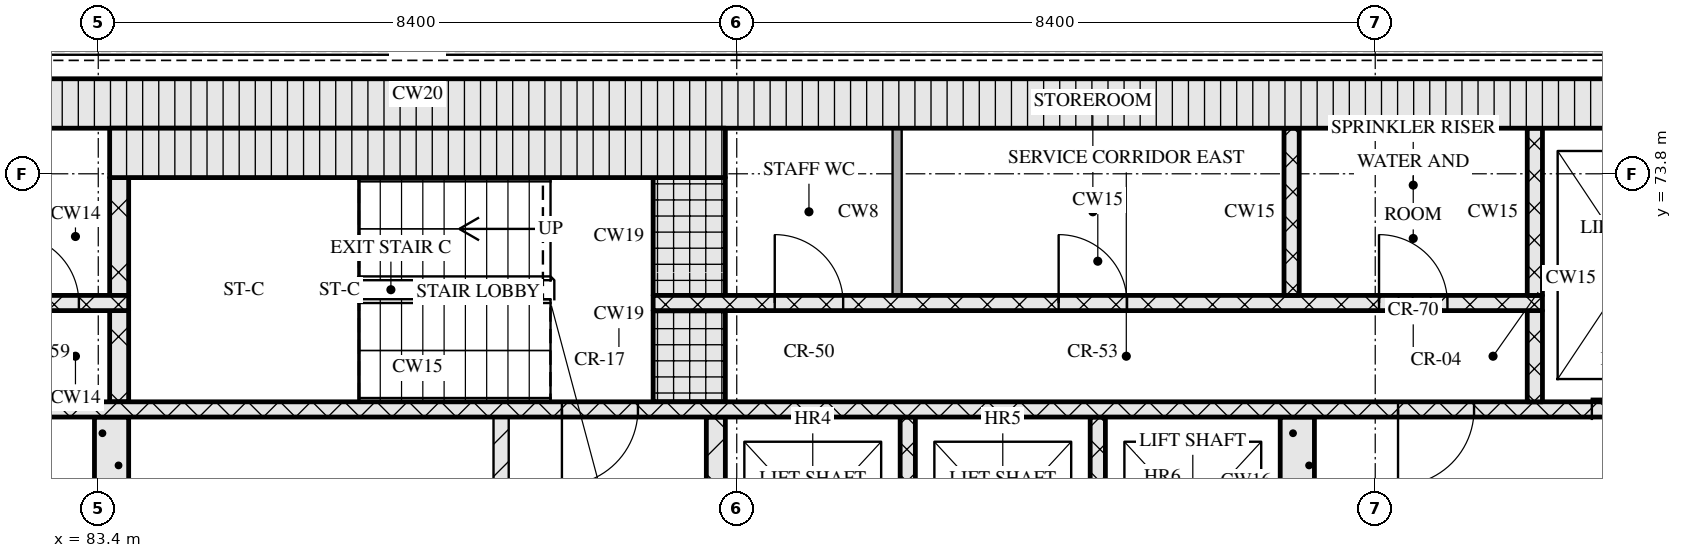
"""IFC4 building model, lengths in metres.
Left out: names, types, materials, properties, quantities, classifications, styles, units other than length and angle.
Written with IfcOpenShell. Run it as: python <this file> out.ifc"""

import sys

from ifc_helpers import new_model, si_unit, direction, frame, frame_2d, origin, place, context, subcontext, project, spatial, rectangle, extrude, element, fill, save


model = new_model("IFC4")
c1 = context("Model", 3, precision=1e-05, world=origin(), true_north=direction((0.0, 1.0)))
c2 = subcontext(c1, "Body", "Model", "MODEL_VIEW")
j1 = project(units=[si_unit("LENGTHUNIT", "METRE"), si_unit("PLANEANGLEUNIT", "RADIAN")], contexts=[c1])
p1 = place(None, origin())
s1 = spatial("IfcSite", under=j1, at=p1, CompositionType="ELEMENT")
p2 = place(p1, origin())
s2 = spatial("IfcBuilding", under=s1, at=p2, CompositionType="ELEMENT")
p3 = place(p2, frame((0.0, 0.0, 223.5)))
s3 = spatial("IfcBuildingStorey", under=s2, at=p3, CompositionType="ELEMENT", Elevation=223.5)
p4 = place(p3, frame((67.15, 74.725, 0.0), z_axis=(0.0, 0.0, 1.0), x_axis=(1.0, 0.0, 0.0)))
e1 = element("IfcWall", 1, at=p4, inside=s3, PredefinedType="SOLIDWALL", context=c2, shape_type="SweptSolid", body=[
    extrude(rectangle(XDim=40.9, YDim=0.65, at=frame_2d((20.45, 0.0))), origin(), (0.0, 0.0, 1.0), 3.32),
])
p5 = place(p3, frame((83.575, 68.0, 0.0), z_axis=(0.0, 0.0, 1.0), x_axis=(0.0, 1.0, 0.0)))
e2 = element("IfcWall", 2, at=p5, inside=s3, PredefinedType="SOLIDWALL", context=c2, shape_type="SweptSolid", body=[
    extrude(rectangle(XDim=2.6, YDim=0.45, at=frame_2d((1.3, 0.0))), origin(), (0.0, 0.0, 1.0), 3.32),
])
p6 = place(p3, frame((88.7, 68.0, 0.0), z_axis=(0.0, 0.0, 1.0), x_axis=(0.0, 1.0, 0.0)))
e3 = element("IfcWall", 3, at=p6, inside=s3, PredefinedType="PARTITIONING", context=c2, shape_type="SweptSolid", body=[
    extrude(rectangle(XDim=2.6, YDim=0.2, at=frame_2d((1.3, 0.0))), origin(), (0.0, 0.0, 1.0), 3.32),
])
p7 = place(p3, frame((91.525, 68.0, 0.0), z_axis=(0.0, 0.0, 1.0), x_axis=(0.0, 1.0, 0.0)))
e4 = element("IfcWall", 4, at=p7, inside=s3, PredefinedType="SOLIDWALL", context=c2, shape_type="SweptSolid", body=[
    extrude(rectangle(XDim=2.6, YDim=0.25, at=frame_2d((1.3, 0.0))), origin(), (0.0, 0.0, 1.0), 3.32),
])
for number, where, z_axis, x_axis in (
    (5, (94.05, 68.0, 0.0), (0.0, 0.0, 1.0), (0.0, 1.0, 0.0)),
    (6, (96.55, 68.0, 0.0), (0.0, 0.0, 1.0), (0.0, 1.0, 0.0)),
):
    element("IfcWall", number, at=place(p3, frame(where, z_axis=z_axis, x_axis=x_axis)), inside=s3, PredefinedType="SOLIDWALL", context=c2, shape_type="SweptSolid", body=[
        extrude(rectangle(XDim=2.6, YDim=0.2, at=frame_2d((1.3, 0.0))), origin(), (0.0, 0.0, 1.0), 3.32),
    ])
p8 = place(p3, frame((99.175, 68.3, 0.0), z_axis=(0.0, 0.0, 1.0), x_axis=(0.0, 1.0, 0.0)))
e7 = element("IfcWall", 7, at=p8, inside=s3, PredefinedType="SOLIDWALL", context=c2, shape_type="SweptSolid", body=[
    extrude(rectangle(XDim=2.3, YDim=0.45, at=frame_2d((1.15, 0.0))), origin(), (0.0, 0.0, 1.0), 3.32),
])
p9 = place(p3, frame((67.8, 70.7, 0.0), z_axis=(0.0, 0.0, 1.0), x_axis=(1.0, 0.0, 0.0)))
e8 = element("IfcWall", 8, at=p9, inside=s3, PredefinedType="SOLIDWALL", context=c2, shape_type="SweptSolid", body=[
    extrude(rectangle(XDim=39.6, YDim=0.2, at=frame_2d((19.8, 0.0))), origin(), (0.0, 0.0, 1.0), 3.32),
])
p10 = place(p9, frame((0.65, 0.0, 0.0)))
e9 = element("IfcOpeningElement", 9, at=p10, cuts=e8, PredefinedType="OPENING", context=c2, shape_type="SweptSolid", body=[
    extrude(rectangle(XDim=1.1, YDim=2.1, at=frame_2d((0.55, 1.05))), frame((0.0, 0.11, 0.0), z_axis=(0.0, -1.0, 0.0), x_axis=(1.0, 0.0, 0.0)), (0.0, 0.0, 1.0), 0.22),
])
p11 = place(p9, frame((3.25, 0.0, 0.0)))
e10 = element("IfcOpeningElement", 10, at=p11, cuts=e8, PredefinedType="OPENING", context=c2, shape_type="SweptSolid", body=[
    extrude(rectangle(XDim=1.1, YDim=2.1, at=frame_2d((0.55, 1.05))), frame((0.0, 0.11, 0.0), z_axis=(0.0, -1.0, 0.0), x_axis=(1.0, 0.0, 0.0)), (0.0, 0.0, 1.0), 0.22),
])
p12 = place(p9, frame((5.9, 0.0, 0.0)))
e11 = element("IfcOpeningElement", 11, at=p12, cuts=e8, PredefinedType="OPENING", context=c2, shape_type="SweptSolid", body=[
    extrude(rectangle(XDim=1.0, YDim=2.1, at=frame_2d((0.5, 1.05))), frame((0.0, 0.11, 0.0), z_axis=(0.0, -1.0, 0.0), x_axis=(1.0, 0.0, 0.0)), (0.0, 0.0, 1.0), 0.22),
])
p13 = place(p9, frame((21.7, 0.0, 0.0)))
e12 = element("IfcOpeningElement", 12, at=p13, cuts=e8, PredefinedType="OPENING", context=c2, shape_type="SweptSolid", body=[
    extrude(rectangle(XDim=1.0, YDim=2.1, at=frame_2d((0.5, 1.05))), frame((0.0, 0.11, 0.0), z_axis=(0.0, -1.0, 0.0), x_axis=(1.0, 0.0, 0.0)), (0.0, 0.0, 1.0), 0.22),
])
p14 = place(p9, frame((32.7, 0.0, 0.0)))
e13 = element("IfcOpeningElement", 13, at=p14, cuts=e8, PredefinedType="OPENING", context=c2, shape_type="SweptSolid", body=[
    extrude(rectangle(XDim=1.0, YDim=2.1, at=frame_2d((0.5, 1.05))), frame((0.0, 0.11, 0.0), z_axis=(0.0, -1.0, 0.0), x_axis=(1.0, 0.0, 0.0)), (0.0, 0.0, 1.0), 0.22),
])
p15 = place(p9, frame((35.25, 0.0, 0.0)))
e14 = element("IfcOpeningElement", 14, at=p15, cuts=e8, PredefinedType="OPENING", context=c2, shape_type="SweptSolid", body=[
    extrude(rectangle(XDim=1.1, YDim=2.1, at=frame_2d((0.55, 1.05))), frame((0.0, 0.11, 0.0), z_axis=(0.0, -1.0, 0.0), x_axis=(1.0, 0.0, 0.0)), (0.0, 0.0, 1.0), 0.22),
])
p16 = place(p9, frame((37.85, 0.0, 0.0)))
e15 = element("IfcOpeningElement", 15, at=p16, cuts=e8, PredefinedType="OPENING", context=c2, shape_type="SweptSolid", body=[
    extrude(rectangle(XDim=1.1, YDim=2.1, at=frame_2d((0.55, 1.05))), frame((0.0, 0.11, 0.0), z_axis=(0.0, -1.0, 0.0), x_axis=(1.0, 0.0, 0.0)), (0.0, 0.0, 1.0), 0.22),
])
p17 = place(p3, frame((83.675, 70.8, 0.0), z_axis=(0.0, 0.0, 1.0), x_axis=(0.0, 1.0, 0.0)))
e16 = element("IfcWall", 16, at=p17, inside=s3, PredefinedType="SOLIDWALL", context=c2, shape_type="SweptSolid", body=[
    extrude(rectangle(XDim=1.2, YDim=0.25, at=frame_2d((0.6, 0.0))), origin(), (0.0, 0.0, 1.0), 3.32),
])
p18 = place(p3, frame((91.175, 70.8, 0.0), z_axis=(0.0, 0.0, 1.0), x_axis=(0.0, 1.0, 0.0)))
e17 = element("IfcWall", 17, at=p18, inside=s3, PredefinedType="SOLIDWALL", context=c2, shape_type="SweptSolid", body=[
    extrude(rectangle(XDim=1.2, YDim=0.95, at=frame_2d((0.6, 0.0))), origin(), (0.0, 0.0, 1.0), 3.32),
])
p19 = place(p3, frame((102.3, 70.8, 0.0), z_axis=(0.0, 0.0, 1.0), x_axis=(0.0, 1.0, 0.0)))
e18 = element("IfcWall", 18, at=p19, inside=s3, PredefinedType="SOLIDWALL", context=c2, shape_type="SweptSolid", body=[
    extrude(rectangle(XDim=1.2, YDim=0.2, at=frame_2d((0.6, 0.0))), origin(), (0.0, 0.0, 1.0), 3.32),
])
p20 = place(p3, frame((72.8, 72.1, 0.0), z_axis=(0.0, 0.0, 1.0), x_axis=(1.0, 0.0, 0.0)))
e19 = element("IfcWall", 19, at=p20, inside=s3, PredefinedType="SOLIDWALL", context=c2, shape_type="SweptSolid", body=[
    extrude(rectangle(XDim=11.0, YDim=0.2, at=frame_2d((5.5, 0.0))), origin(), (0.0, 0.0, 1.0), 3.32),
])
p21 = place(p20, frame((1.25, 0.0, 0.0)))
e20 = element("IfcOpeningElement", 20, at=p21, cuts=e19, PredefinedType="OPENING", context=c2, shape_type="SweptSolid", body=[
    extrude(rectangle(XDim=0.9, YDim=2.1, at=frame_2d((0.45, 1.05))), frame((0.0, 0.11, 0.0), z_axis=(0.0, -1.0, 0.0), x_axis=(1.0, 0.0, 0.0)), (0.0, 0.0, 1.0), 0.22),
])
p22 = place(p20, frame((4.65, 0.0, 0.0)))
e21 = element("IfcOpeningElement", 21, at=p22, cuts=e19, PredefinedType="OPENING", context=c2, shape_type="SweptSolid", body=[
    extrude(rectangle(XDim=0.9, YDim=2.1, at=frame_2d((0.45, 1.05))), frame((0.0, 0.11, 0.0), z_axis=(0.0, -1.0, 0.0), x_axis=(1.0, 0.0, 0.0)), (0.0, 0.0, 1.0), 0.22),
])
p23 = place(p20, frame((7.47, 0.0, 0.0)))
e22 = element("IfcOpeningElement", 22, at=p23, cuts=e19, PredefinedType="OPENING", context=c2, shape_type="SweptSolid", body=[
    extrude(rectangle(XDim=0.9, YDim=2.1, at=frame_2d((0.45, 1.05))), frame((0.0, 0.11, 0.0), z_axis=(0.0, -1.0, 0.0), x_axis=(1.0, 0.0, 0.0)), (0.0, 0.0, 1.0), 0.22),
])
p24 = place(p20, frame((9.445, 0.0, 0.0)))
e23 = element("IfcOpeningElement", 23, at=p24, cuts=e19, PredefinedType="OPENING", context=c2, shape_type="SweptSolid", body=[
    extrude(rectangle(XDim=0.9, YDim=2.1, at=frame_2d((0.45, 1.05))), frame((0.0, 0.11, 0.0), z_axis=(0.0, -1.0, 0.0), x_axis=(1.0, 0.0, 0.0)), (0.0, 0.0, 1.0), 0.22),
])
p25 = place(p3, frame((90.7, 72.1, 0.0), z_axis=(0.0, 0.0, 1.0), x_axis=(1.0, 0.0, 0.0)))
e24 = element("IfcWall", 24, at=p25, inside=s3, PredefinedType="SOLIDWALL", context=c2, shape_type="SweptSolid", body=[
    extrude(rectangle(XDim=11.7, YDim=0.2, at=frame_2d((5.85, 0.0))), origin(), (0.0, 0.0, 1.0), 3.32),
])
p26 = place(p25, frame((1.6, 0.0, 0.0)))
e25 = element("IfcOpeningElement", 25, at=p26, cuts=e24, PredefinedType="OPENING", context=c2, shape_type="SweptSolid", body=[
    extrude(rectangle(XDim=0.9, YDim=2.1, at=frame_2d((0.45, 1.05))), frame((0.0, 0.11, 0.0), z_axis=(0.0, -1.0, 0.0), x_axis=(1.0, 0.0, 0.0)), (0.0, 0.0, 1.0), 0.22),
])
p27 = place(p25, frame((5.335, 0.0, 0.0)))
e26 = element("IfcOpeningElement", 26, at=p27, cuts=e24, PredefinedType="OPENING", context=c2, shape_type="SweptSolid", body=[
    extrude(rectangle(XDim=0.9, YDim=2.1, at=frame_2d((0.45, 1.05))), frame((0.0, 0.11, 0.0), z_axis=(0.0, -1.0, 0.0), x_axis=(1.0, 0.0, 0.0)), (0.0, 0.0, 1.0), 0.22),
])
p28 = place(p25, frame((9.55, 0.0, 0.0)))
e27 = element("IfcOpeningElement", 27, at=p28, cuts=e24, PredefinedType="OPENING", context=c2, shape_type="SweptSolid", body=[
    extrude(rectangle(XDim=0.9, YDim=2.1, at=frame_2d((0.45, 1.05))), frame((0.0, 0.11, 0.0), z_axis=(0.0, -1.0, 0.0), x_axis=(1.0, 0.0, 0.0)), (0.0, 0.0, 1.0), 0.22),
])
p29 = place(p3, frame((83.675, 72.2, 0.0), z_axis=(0.0, 0.0, 1.0), x_axis=(0.0, 1.0, 0.0)))
e28 = element("IfcWall", 28, at=p29, inside=s3, PredefinedType="SOLIDWALL", context=c2, shape_type="SweptSolid", body=[
    extrude(rectangle(XDim=1.55, YDim=0.25, at=frame_2d((0.775, 0.0))), origin(), (0.0, 0.0, 1.0), 3.32),
])
p30 = place(p3, frame((91.175, 72.2, 0.0), z_axis=(0.0, 0.0, 1.0), x_axis=(0.0, 1.0, 0.0)))
e29 = element("IfcWall", 29, at=p30, inside=s3, PredefinedType="SOLIDWALL", context=c2, shape_type="SweptSolid", body=[
    extrude(rectangle(XDim=1.55, YDim=0.95, at=frame_2d((0.775, 0.0))), origin(), (0.0, 0.0, 1.0), 3.32),
])
p31 = place(p3, frame((93.91, 72.2, 0.0), z_axis=(0.0, 0.0, 1.0), x_axis=(0.0, 1.0, 0.0)))
e30 = element("IfcWall", 30, at=p31, inside=s3, PredefinedType="PARTITIONING", context=c2, shape_type="SweptSolid", body=[
    extrude(rectangle(XDim=2.2, YDim=0.12, at=frame_2d((1.1, 0.0))), origin(), (0.0, 0.0, 1.0), 3.32),
])
for number, where, z_axis, x_axis in (
    (31, (99.1, 72.2, 0.0), (0.0, 0.0, 1.0), (0.0, 1.0, 0.0)),
    (32, (102.3, 72.2, 0.0), (0.0, 0.0, 1.0), (0.0, 1.0, 0.0)),
):
    element("IfcWall", number, at=place(p3, frame(where, z_axis=z_axis, x_axis=x_axis)), inside=s3, PredefinedType="SOLIDWALL", context=c2, shape_type="SweptSolid", body=[
        extrude(rectangle(XDim=2.2, YDim=0.2, at=frame_2d((1.1, 0.0))), origin(), (0.0, 0.0, 1.0), 3.32),
    ])
p32 = place(p3, frame((83.55, 74.075, 0.0), z_axis=(0.0, 0.0, 1.0), x_axis=(1.0, 0.0, 0.0)))
e33 = element("IfcWall", 33, at=p32, inside=s3, PredefinedType="SOLIDWALL", context=c2, shape_type="SweptSolid", body=[
    extrude(rectangle(XDim=8.1, YDim=0.65, at=frame_2d((4.05, 0.0))), origin(), (0.0, 0.0, 1.0), 3.32),
])
p33 = place(p13, origin())
e34 = element("IfcDoor", 34, at=p33, inside=s3, OperationType="SINGLE_SWING_RIGHT", PredefinedType="DOOR", context=c2, shape_type="SweptSolid", body=[
    extrude(rectangle(XDim=1.0, YDim=2.1, at=frame_2d((0.5, 1.05))), frame((0.0, 0.025, 0.0), z_axis=(0.0, -1.0, 0.0), x_axis=(1.0, 0.0, 0.0)), (0.0, 0.0, 1.0), 0.05),
])
fill(e12, e34)
p34 = place(p14, origin())
e35 = element("IfcDoor", 35, at=p34, inside=s3, OperationType="SINGLE_SWING_RIGHT", PredefinedType="DOOR", context=c2, shape_type="SweptSolid", body=[
    extrude(rectangle(XDim=1.0, YDim=2.1, at=frame_2d((0.5, 1.05))), frame((0.0, 0.025, 0.0), z_axis=(0.0, -1.0, 0.0), x_axis=(1.0, 0.0, 0.0)), (0.0, 0.0, 1.0), 0.05),
])
fill(e13, e35)
p35 = place(p15, origin())
e36 = element("IfcDoor", 36, at=p35, inside=s3, OperationType="SLIDING_TO_RIGHT", PredefinedType="DOOR", context=c2, shape_type="SweptSolid", body=[
    extrude(rectangle(XDim=1.1, YDim=2.1, at=frame_2d((0.55, 1.05))), frame((0.0, 0.025, 0.0), z_axis=(0.0, -1.0, 0.0), x_axis=(1.0, 0.0, 0.0)), (0.0, 0.0, 1.0), 0.05),
])
fill(e14, e36)
p36 = place(p24, origin())
e37 = element("IfcDoor", 37, at=p36, inside=s3, OperationType="SINGLE_SWING_LEFT", PredefinedType="DOOR", context=c2, shape_type="SweptSolid", body=[
    extrude(rectangle(XDim=0.9, YDim=2.1, at=frame_2d((0.45, 1.05))), frame((0.0, 0.025, 0.0), z_axis=(0.0, -1.0, 0.0), x_axis=(1.0, 0.0, 0.0)), (0.0, 0.0, 1.0), 0.05),
])
fill(e23, e37)
p37 = place(p26, origin())
e38 = element("IfcDoor", 38, at=p37, inside=s3, OperationType="SINGLE_SWING_LEFT", PredefinedType="DOOR", context=c2, shape_type="SweptSolid", body=[
    extrude(rectangle(XDim=0.9, YDim=2.1, at=frame_2d((0.45, 1.05))), frame((0.0, 0.025, 0.0), z_axis=(0.0, -1.0, 0.0), x_axis=(1.0, 0.0, 0.0)), (0.0, 0.0, 1.0), 0.05),
])
fill(e25, e38)
p38 = place(p27, origin())
e39 = element("IfcDoor", 39, at=p38, inside=s3, OperationType="SINGLE_SWING_LEFT", PredefinedType="DOOR", context=c2, shape_type="SweptSolid", body=[
    extrude(rectangle(XDim=0.9, YDim=2.1, at=frame_2d((0.45, 1.05))), frame((0.0, 0.025, 0.0), z_axis=(0.0, -1.0, 0.0), x_axis=(1.0, 0.0, 0.0)), (0.0, 0.0, 1.0), 0.05),
])
fill(e26, e39)
p39 = place(p28, origin())
e40 = element("IfcDoor", 40, at=p39, inside=s3, OperationType="SINGLE_SWING_LEFT", PredefinedType="DOOR", context=c2, shape_type="SweptSolid", body=[
    extrude(rectangle(XDim=0.9, YDim=2.1, at=frame_2d((0.45, 1.05))), frame((0.0, 0.025, 0.0), z_axis=(0.0, -1.0, 0.0), x_axis=(1.0, 0.0, 0.0)), (0.0, 0.0, 1.0), 0.05),
])
fill(e27, e40)
save(model, sys.argv[1])
